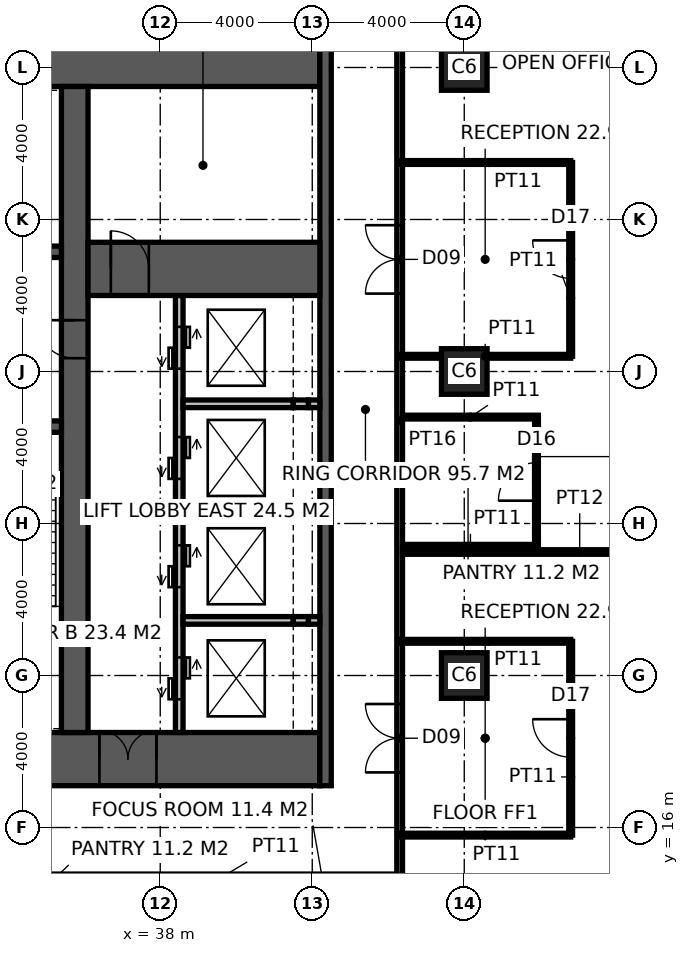
"""IFC4 building model, lengths in metres.
Left out: names, types, materials, properties, quantities, classifications, styles, units other than length and angle.
Written with IfcOpenShell. Run it as: python <this file> out.ifc"""

import sys

from ifc_helpers import new_model, si_unit, direction, frame, frame_2d, origin, origin_2d, place, context, subcontext, project, spatial, rectangle, hollow_rectangle, extrude, element, fill, save


model = new_model("IFC4")
c1 = context("Model", 3, precision=1e-05, world=origin(), true_north=direction((0.0, 1.0)))
c2 = subcontext(c1, "Body", "Model", "MODEL_VIEW")
j1 = project(units=[si_unit("LENGTHUNIT", "METRE"), si_unit("PLANEANGLEUNIT", "RADIAN")], contexts=[c1])
p1 = place(None, origin())
s1 = spatial("IfcSite", under=j1, at=p1, CompositionType="ELEMENT")
p2 = place(p1, origin())
s2 = spatial("IfcBuilding", under=s1, at=p2, CompositionType="ELEMENT")
p3 = place(p2, frame((0.0, 0.0, 67.0)))
s3 = spatial("IfcBuildingStorey", under=s2, at=p3, CompositionType="ELEMENT", Elevation=67.0)
for number, where, z_axis, x_axis in (
    (1, (46.0, 20.0, 0.0), (0.0, 0.0, 1.0), (1.0, 0.0, 0.0)),
    (2, (46.0, 28.0, 0.0), (0.0, 0.0, 1.0), (1.0, 0.0, 0.0)),
    (3, (46.0, 36.0, 0.0), (0.0, 0.0, 1.0), (1.0, 0.0, 0.0)),
):
    element("IfcColumn", number, at=place(p3, frame(where, z_axis=z_axis, x_axis=x_axis)), inside=s3, PredefinedType="COLUMN", context=c2, shape_type="SweptSolid", body=[
        extrude(hollow_rectangle(XDim=1.2, YDim=1.2, WallThickness=0.125, at=origin_2d()), origin(), (0.0, 0.0, 1.0), 4.0),
    ])
p4 = place(p3, frame((18.5, 17.8, -0.15), z_axis=(0.0, 0.0, 1.0), x_axis=(1.0, 0.0, 0.0)))
e4 = element("IfcWall", 4, at=p4, inside=s3, PredefinedType="SHEAR", context=c2, shape_type="SweptSolid", body=[
    extrude(rectangle(XDim=23.7, YDim=1.4, at=frame_2d((11.85, 0.0))), origin(), (0.0, 0.0, 1.0), 4.0),
])
p5 = place(p4, frame((3.45, 0.0, 0.15)))
e5 = element("IfcOpeningElement", 5, at=p5, cuts=e4, PredefinedType="OPENING", context=c2, shape_type="SweptSolid", body=[
    extrude(rectangle(XDim=1.5, YDim=2.4, at=frame_2d((0.75, 1.2))), frame((0.0, 0.71, 0.0), z_axis=(0.0, -1.0, 0.0), x_axis=(1.0, 0.0, 0.0)), (0.0, 0.0, 1.0), 1.42),
])
p6 = place(p4, frame((17.9, 0.0, 0.15)))
e6 = element("IfcOpeningElement", 6, at=p6, cuts=e4, PredefinedType="OPENING", context=c2, shape_type="SweptSolid", body=[
    extrude(rectangle(XDim=1.5, YDim=2.4, at=frame_2d((0.75, 1.2))), frame((0.0, 0.71, 0.0), z_axis=(0.0, -1.0, 0.0), x_axis=(1.0, 0.0, 0.0)), (0.0, 0.0, 1.0), 1.42),
])
p7 = place(p4, frame((0.9, 0.0, 0.15)))
e7 = element("IfcOpeningElement", 7, at=p7, cuts=e4, PredefinedType="OPENING", context=c2, shape_type="SweptSolid", body=[
    extrude(rectangle(XDim=1.0, YDim=2.2, at=frame_2d((0.5, 1.1))), frame((0.0, 0.71, 0.0), z_axis=(0.0, -1.0, 0.0), x_axis=(1.0, 0.0, 0.0)), (0.0, 0.0, 1.0), 1.42),
])
p8 = place(p3, frame((18.5, 36.2, -0.15), z_axis=(0.0, 0.0, 1.0), x_axis=(1.0, 0.0, 0.0)))
e8 = element("IfcWall", 8, at=p8, inside=s3, PredefinedType="SHEAR", context=c2, shape_type="SweptSolid", body=[
    extrude(rectangle(XDim=23.7, YDim=1.4, at=frame_2d((11.85, 0.0))), origin(), (0.0, 0.0, 1.0), 4.0),
])
p9 = place(p3, frame((42.35, 17.1, -0.15), z_axis=(0.0, 0.0, 1.0), x_axis=(0.0, 1.0, 0.0)))
e9 = element("IfcWall", 9, at=p9, inside=s3, PredefinedType="SHEAR", context=c2, shape_type="SweptSolid", body=[
    extrude(rectangle(XDim=19.8, YDim=0.3, at=frame_2d((9.9, 0.0))), origin(), (0.0, 0.0, 1.0), 4.0),
])
p10 = place(p3, frame((35.75, 18.5, -0.15), z_axis=(0.0, 0.0, 1.0), x_axis=(0.0, 1.0, 0.0)))
e10 = element("IfcWall", 10, at=p10, inside=s3, PredefinedType="SHEAR", context=c2, shape_type="SweptSolid", body=[
    extrude(rectangle(XDim=17.0, YDim=0.7, at=frame_2d((8.5, 0.0))), origin(), (0.0, 0.0, 1.0), 4.0),
])
p11 = place(p10, frame((9.85, 0.0, 0.15)))
e11 = element("IfcOpeningElement", 11, at=p11, cuts=e10, PredefinedType="OPENING", context=c2, shape_type="SweptSolid", body=[
    extrude(rectangle(XDim=1.0, YDim=2.2, at=frame_2d((0.5, 1.1))), frame((0.0, 0.36, 0.0), z_axis=(0.0, -1.0, 0.0), x_axis=(1.0, 0.0, 0.0)), (0.0, 0.0, 1.0), 0.72),
])
p12 = place(p3, frame((24.15, 26.55, -0.15), z_axis=(0.0, 0.0, 1.0), x_axis=(1.0, 0.0, 0.0)))
e12 = element("IfcWall", 12, at=p12, inside=s3, PredefinedType="SHEAR", context=c2, shape_type="SweptSolid", body=[
    extrude(rectangle(XDim=11.25, YDim=0.3, at=frame_2d((5.625, 0.0))), origin(), (0.0, 0.0, 1.0), 4.0),
])
p13 = place(p12, frame((9.25, 0.0, 0.15)))
e13 = element("IfcOpeningElement", 13, at=p13, cuts=e12, PredefinedType="OPENING", context=c2, shape_type="SweptSolid", body=[
    extrude(rectangle(XDim=1.0, YDim=2.2, at=frame_2d((0.5, 1.1))), frame((0.0, 0.16, 0.0), z_axis=(0.0, -1.0, 0.0), x_axis=(1.0, 0.0, 0.0)), (0.0, 0.0, 1.0), 0.32),
])
p14 = place(p12, frame((4.9, 0.0, 0.15)))
e14 = element("IfcOpeningElement", 14, at=p14, cuts=e12, PredefinedType="OPENING", context=c2, shape_type="SweptSolid", body=[
    extrude(rectangle(XDim=1.5, YDim=2.4, at=frame_2d((0.75, 1.2))), frame((0.0, 0.16, 0.0), z_axis=(0.0, -1.0, 0.0), x_axis=(1.0, 0.0, 0.0)), (0.0, 0.0, 1.0), 0.32),
])
p15 = place(p3, frame((24.15, 31.15, -0.15), z_axis=(0.0, 0.0, 1.0), x_axis=(1.0, 0.0, 0.0)))
e15 = element("IfcWall", 15, at=p15, inside=s3, PredefinedType="SHEAR", context=c2, shape_type="SweptSolid", body=[
    extrude(rectangle(XDim=11.25, YDim=0.3, at=frame_2d((5.625, 0.0))), origin(), (0.0, 0.0, 1.0), 4.0),
])
p16 = place(p15, frame((7.25, 0.0, 0.15)))
e16 = element("IfcOpeningElement", 16, at=p16, cuts=e15, PredefinedType="OPENING", context=c2, shape_type="SweptSolid", body=[
    extrude(rectangle(XDim=1.4, YDim=2.4, at=frame_2d((0.7, 1.2))), frame((0.0, 0.16, 0.0), z_axis=(0.0, -1.0, 0.0), x_axis=(1.0, 0.0, 0.0)), (0.0, 0.0, 1.0), 0.32),
])
p17 = place(p3, frame((38.5, 18.5, -0.15), z_axis=(0.0, 0.0, 1.0), x_axis=(0.0, 1.0, 0.0)))
e17 = element("IfcWall", 17, at=p17, inside=s3, PredefinedType="SOLIDWALL", context=c2, shape_type="SweptSolid", body=[
    extrude(rectangle(XDim=11.5, YDim=0.2, at=frame_2d((5.75, 0.0))), origin(), (0.0, 0.0, 1.0), 4.0),
])
p18 = place(p17, frame((0.875, 0.0, 0.15)))
e18 = element("IfcOpeningElement", 18, at=p18, cuts=e17, PredefinedType="OPENING", context=c2, shape_type="SweptSolid", body=[
    extrude(rectangle(XDim=1.1, YDim=2.2, at=frame_2d((0.55, 1.1))), frame((0.0, 0.11, 0.0), z_axis=(0.0, -1.0, 0.0), x_axis=(1.0, 0.0, 0.0)), (0.0, 0.0, 1.0), 0.22),
])
p19 = place(p17, frame((3.825, 0.0, 0.15)))
e19 = element("IfcOpeningElement", 19, at=p19, cuts=e17, PredefinedType="OPENING", context=c2, shape_type="SweptSolid", body=[
    extrude(rectangle(XDim=1.1, YDim=2.2, at=frame_2d((0.55, 1.1))), frame((0.0, 0.11, 0.0), z_axis=(0.0, -1.0, 0.0), x_axis=(1.0, 0.0, 0.0)), (0.0, 0.0, 1.0), 0.22),
])
p20 = place(p17, frame((6.675, 0.0, 0.15)))
e20 = element("IfcOpeningElement", 20, at=p20, cuts=e17, PredefinedType="OPENING", context=c2, shape_type="SweptSolid", body=[
    extrude(rectangle(XDim=1.1, YDim=2.2, at=frame_2d((0.55, 1.1))), frame((0.0, 0.11, 0.0), z_axis=(0.0, -1.0, 0.0), x_axis=(1.0, 0.0, 0.0)), (0.0, 0.0, 1.0), 0.22),
])
p21 = place(p17, frame((9.575, 0.0, 0.15)))
e21 = element("IfcOpeningElement", 21, at=p21, cuts=e17, PredefinedType="OPENING", context=c2, shape_type="SweptSolid", body=[
    extrude(rectangle(XDim=1.1, YDim=2.2, at=frame_2d((0.55, 1.1))), frame((0.0, 0.11, 0.0), z_axis=(0.0, -1.0, 0.0), x_axis=(1.0, 0.0, 0.0)), (0.0, 0.0, 1.0), 0.22),
])
p22 = place(p3, frame((36.1, 30.7, -0.15), z_axis=(0.0, 0.0, 1.0), x_axis=(1.0, 0.0, 0.0)))
e22 = element("IfcWall", 22, at=p22, inside=s3, PredefinedType="SHEAR", context=c2, shape_type="SweptSolid", body=[
    extrude(rectangle(XDim=6.1, YDim=1.4, at=frame_2d((3.05, 0.0))), origin(), (0.0, 0.0, 1.0), 4.0),
])
p23 = place(p22, frame((0.6, 0.0, 0.15)))
e23 = element("IfcOpeningElement", 23, at=p23, cuts=e22, PredefinedType="OPENING", context=c2, shape_type="SweptSolid", body=[
    extrude(rectangle(XDim=1.0, YDim=2.2, at=frame_2d((0.5, 1.1))), frame((0.0, 0.71, 0.0), z_axis=(0.0, -1.0, 0.0), x_axis=(1.0, 0.0, 0.0)), (0.0, 0.0, 1.0), 1.42),
])
p24 = place(p3, frame((38.6, 21.45, -0.15), z_axis=(0.0, 0.0, 1.0), x_axis=(1.0, 0.0, 0.0)))
e24 = element("IfcWall", 24, at=p24, inside=s3, PredefinedType="SOLIDWALL", context=c2, shape_type="SweptSolid", body=[
    extrude(rectangle(XDim=2.9, YDim=0.2, at=frame_2d((1.45, 0.0))), origin(), (0.0, 0.0, 1.0), 4.0),
])
p25 = place(p3, frame((41.5, 21.45, -0.15), z_axis=(0.0, 0.0, 1.0), x_axis=(1.0, 0.0, 0.0)))
e25 = element("IfcWall", 25, at=p25, inside=s3, PredefinedType="SOLIDWALL", context=c2, shape_type="SweptSolid", body=[
    extrude(rectangle(XDim=0.4, YDim=0.2, at=frame_2d((0.2, 0.0))), origin(), (0.0, 0.0, 1.0), 4.0),
])
p26 = place(p3, frame((41.9, 21.45, -0.15), z_axis=(0.0, 0.0, 1.0), x_axis=(1.0, 0.0, 0.0)))
e26 = element("IfcWall", 26, at=p26, inside=s3, PredefinedType="SOLIDWALL", context=c2, shape_type="SweptSolid", body=[
    extrude(rectangle(XDim=0.3, YDim=0.2, at=frame_2d((0.15, 0.0))), origin(), (0.0, 0.0, 1.0), 4.0),
])
p27 = place(p3, frame((38.6, 24.3, -0.15), z_axis=(0.0, 0.0, 1.0), x_axis=(1.0, 0.0, 0.0)))
e27 = element("IfcWall", 27, at=p27, inside=s3, PredefinedType="SOLIDWALL", context=c2, shape_type="SweptSolid", body=[
    extrude(rectangle(XDim=2.9, YDim=0.2, at=frame_2d((1.45, 0.0))), origin(), (0.0, 0.0, 1.0), 4.0),
])
p28 = place(p3, frame((41.5, 24.3, -0.15), z_axis=(0.0, 0.0, 1.0), x_axis=(1.0, 0.0, 0.0)))
e28 = element("IfcWall", 28, at=p28, inside=s3, PredefinedType="SOLIDWALL", context=c2, shape_type="SweptSolid", body=[
    extrude(rectangle(XDim=0.4, YDim=0.2, at=frame_2d((0.2, 0.0))), origin(), (0.0, 0.0, 1.0), 4.0),
])
p29 = place(p3, frame((41.9, 24.3, -0.15), z_axis=(0.0, 0.0, 1.0), x_axis=(1.0, 0.0, 0.0)))
e29 = element("IfcWall", 29, at=p29, inside=s3, PredefinedType="SOLIDWALL", context=c2, shape_type="SweptSolid", body=[
    extrude(rectangle(XDim=0.3, YDim=0.2, at=frame_2d((0.15, 0.0))), origin(), (0.0, 0.0, 1.0), 4.0),
])
p30 = place(p3, frame((38.6, 27.15, -0.15), z_axis=(0.0, 0.0, 1.0), x_axis=(1.0, 0.0, 0.0)))
e30 = element("IfcWall", 30, at=p30, inside=s3, PredefinedType="SOLIDWALL", context=c2, shape_type="SweptSolid", body=[
    extrude(rectangle(XDim=2.9, YDim=0.2, at=frame_2d((1.45, 0.0))), origin(), (0.0, 0.0, 1.0), 4.0),
])
p31 = place(p3, frame((41.5, 27.15, -0.15), z_axis=(0.0, 0.0, 1.0), x_axis=(1.0, 0.0, 0.0)))
e31 = element("IfcWall", 31, at=p31, inside=s3, PredefinedType="SOLIDWALL", context=c2, shape_type="SweptSolid", body=[
    extrude(rectangle(XDim=0.4, YDim=0.2, at=frame_2d((0.2, 0.0))), origin(), (0.0, 0.0, 1.0), 4.0),
])
p32 = place(p3, frame((41.9, 27.15, -0.15), z_axis=(0.0, 0.0, 1.0), x_axis=(1.0, 0.0, 0.0)))
e32 = element("IfcWall", 32, at=p32, inside=s3, PredefinedType="SOLIDWALL", context=c2, shape_type="SweptSolid", body=[
    extrude(rectangle(XDim=0.3, YDim=0.2, at=frame_2d((0.15, 0.0))), origin(), (0.0, 0.0, 1.0), 4.0),
])
p33 = place(p3, frame((44.3, 14.625, 0.0), z_axis=(0.0, 0.0, 1.0), x_axis=(0.0, 1.0, 0.0)))
e33 = element("IfcWall", 33, at=p33, inside=s3, PredefinedType="PARTITIONING", context=c2, shape_type="SweptSolid", body=[
    extrude(rectangle(XDim=24.15, YDim=0.15, at=frame_2d((12.075, 0.0))), origin(), (0.0, 0.0, 1.0), 3.85),
])
p34 = place(p33, frame((2.825, 0.0, 0.0)))
e34 = element("IfcOpeningElement", 34, at=p34, cuts=e33, PredefinedType="OPENING", context=c2, shape_type="SweptSolid", body=[
    extrude(rectangle(XDim=1.8, YDim=2.4, at=frame_2d((0.9, 1.2))), frame((0.0, 0.085, 0.0), z_axis=(0.0, -1.0, 0.0), x_axis=(1.0, 0.0, 0.0)), (0.0, 0.0, 1.0), 0.17),
])
p35 = place(p33, frame((15.425, 0.0, 0.0)))
e35 = element("IfcOpeningElement", 35, at=p35, cuts=e33, PredefinedType="OPENING", context=c2, shape_type="SweptSolid", body=[
    extrude(rectangle(XDim=1.8, YDim=2.4, at=frame_2d((0.9, 1.2))), frame((0.0, 0.085, 0.0), z_axis=(0.0, -1.0, 0.0), x_axis=(1.0, 0.0, 0.0)), (0.0, 0.0, 1.0), 0.17),
])
p36 = place(p3, frame((44.375, 23.25, 0.0), z_axis=(0.0, 0.0, 1.0), x_axis=(1.0, 0.0, 0.0)))
e36 = element("IfcWall", 36, at=p36, inside=s3, PredefinedType="PARTITIONING", context=c2, shape_type="SweptSolid", body=[
    extrude(rectangle(XDim=9.325, YDim=0.12, at=frame_2d((4.663, 0.0))), origin(), (0.0, 0.0, 1.0), 3.85),
])
p37 = place(p3, frame((44.375, 23.4, 0.0), z_axis=(0.0, 0.0, 1.0), x_axis=(1.0, 0.0, 0.0)))
e37 = element("IfcWall", 37, at=p37, inside=s3, PredefinedType="PARTITIONING", context=c2, shape_type="SweptSolid", body=[
    extrude(rectangle(XDim=3.575, YDim=0.1, at=frame_2d((1.788, 0.0))), origin(), (0.0, 0.0, 1.0), 2.65),
])
p38 = place(p3, frame((44.375, 26.8, 0.0), z_axis=(0.0, 0.0, 1.0), x_axis=(1.0, 0.0, 0.0)))
e38 = element("IfcWall", 38, at=p38, inside=s3, PredefinedType="PARTITIONING", context=c2, shape_type="SweptSolid", body=[
    extrude(rectangle(XDim=3.575, YDim=0.1, at=frame_2d((1.788, 0.0))), origin(), (0.0, 0.0, 1.0), 3.85),
])
p39 = place(p3, frame((47.9, 23.45, 0.0), z_axis=(0.0, 0.0, 1.0), x_axis=(0.0, 1.0, 0.0)))
e39 = element("IfcWall", 39, at=p39, inside=s3, PredefinedType="PARTITIONING", context=c2, shape_type="SweptSolid", body=[
    extrude(rectangle(XDim=3.3, YDim=0.1, at=frame_2d((1.65, 0.0))), origin(), (0.0, 0.0, 1.0), 3.85),
])
p40 = place(p39, frame((1.15, 0.0, 0.0)))
e40 = element("IfcOpeningElement", 40, at=p40, cuts=e39, PredefinedType="OPENING", context=c2, shape_type="SweptSolid", body=[
    extrude(rectangle(XDim=1.0, YDim=2.2, at=frame_2d((0.5, 1.1))), frame((0.0, 0.06, 0.0), z_axis=(0.0, -1.0, 0.0), x_axis=(1.0, 0.0, 0.0)), (0.0, 0.0, 1.0), 0.12),
])
p41 = place(p3, frame((44.3, 15.8, 0.0), z_axis=(0.0, 0.0, 1.0), x_axis=(1.0, 0.0, 0.0)))
e41 = element("IfcWall", 41, at=p41, inside=s3, PredefinedType="PARTITIONING", context=c2, shape_type="SweptSolid", body=[
    extrude(rectangle(XDim=4.5, YDim=0.1, at=frame_2d((2.25, 0.0))), origin(), (0.0, 0.0, 1.0), 3.85),
])
p42 = place(p3, frame((48.8, 15.8, 0.0), z_axis=(0.0, 0.0, 1.0), x_axis=(0.0, 1.0, 0.0)))
e42 = element("IfcWall", 42, at=p42, inside=s3, PredefinedType="PARTITIONING", context=c2, shape_type="SweptSolid", body=[
    extrude(rectangle(XDim=5.1, YDim=0.1, at=frame_2d((2.55, 0.0))), origin(), (0.0, 0.0, 1.0), 3.85),
])
p43 = place(p42, frame((2.05, 0.0, 0.0)))
e43 = element("IfcOpeningElement", 43, at=p43, cuts=e42, PredefinedType="OPENING", context=c2, shape_type="SweptSolid", body=[
    extrude(rectangle(XDim=1.0, YDim=2.2, at=frame_2d((0.5, 1.1))), frame((0.0, 0.06, 0.0), z_axis=(0.0, -1.0, 0.0), x_axis=(1.0, 0.0, 0.0)), (0.0, 0.0, 1.0), 0.12),
])
p44 = place(p3, frame((48.8, 20.9, 0.0), z_axis=(0.0, 0.0, 1.0), x_axis=(-1.0, 0.0, 0.0)))
e44 = element("IfcWall", 44, at=p44, inside=s3, PredefinedType="PARTITIONING", context=c2, shape_type="SweptSolid", body=[
    extrude(rectangle(XDim=4.5, YDim=0.1, at=frame_2d((2.25, 0.0))), origin(), (0.0, 0.0, 1.0), 3.85),
])
p45 = place(p3, frame((44.3, 28.4, 0.0), z_axis=(0.0, 0.0, 1.0), x_axis=(1.0, 0.0, 0.0)))
e45 = element("IfcWall", 45, at=p45, inside=s3, PredefinedType="PARTITIONING", context=c2, shape_type="SweptSolid", body=[
    extrude(rectangle(XDim=4.5, YDim=0.1, at=frame_2d((2.25, 0.0))), origin(), (0.0, 0.0, 1.0), 2.65),
])
p46 = place(p3, frame((48.8, 28.4, 0.0), z_axis=(0.0, 0.0, 1.0), x_axis=(0.0, 1.0, 0.0)))
e46 = element("IfcWall", 46, at=p46, inside=s3, PredefinedType="PARTITIONING", context=c2, shape_type="SweptSolid", body=[
    extrude(rectangle(XDim=5.1, YDim=0.1, at=frame_2d((2.55, 0.0))), origin(), (0.0, 0.0, 1.0), 3.85),
])
p47 = place(p46, frame((2.05, 0.0, 0.0)))
e47 = element("IfcOpeningElement", 47, at=p47, cuts=e46, PredefinedType="OPENING", context=c2, shape_type="SweptSolid", body=[
    extrude(rectangle(XDim=1.0, YDim=2.2, at=frame_2d((0.5, 1.1))), frame((0.0, 0.06, 0.0), z_axis=(0.0, -1.0, 0.0), x_axis=(1.0, 0.0, 0.0)), (0.0, 0.0, 1.0), 0.12),
])
p48 = place(p3, frame((48.8, 33.5, 0.0), z_axis=(0.0, 0.0, 1.0), x_axis=(-1.0, 0.0, 0.0)))
e48 = element("IfcWall", 48, at=p48, inside=s3, PredefinedType="PARTITIONING", context=c2, shape_type="SweptSolid", body=[
    extrude(rectangle(XDim=4.5, YDim=0.1, at=frame_2d((2.25, 0.0))), origin(), (0.0, 0.0, 1.0), 3.85),
])
p49 = place(p11, origin())
e49 = element("IfcDoor", 49, at=p49, inside=s3, OperationType="SINGLE_SWING_RIGHT", PredefinedType="DOOR", context=c2, shape_type="SweptSolid", body=[
    extrude(rectangle(XDim=1.0, YDim=2.2, at=frame_2d((0.5, 1.1))), frame((0.0, 0.025, 0.0), z_axis=(0.0, -1.0, 0.0), x_axis=(1.0, 0.0, 0.0)), (0.0, 0.0, 1.0), 0.05),
])
fill(e11, e49)
p50 = place(p6, origin())
e50 = element("IfcDoor", 50, at=p50, inside=s3, OperationType="DOUBLE_DOOR_DOUBLE_SWING", PredefinedType="DOOR", context=c2, shape_type="SweptSolid", body=[
    extrude(rectangle(XDim=1.5, YDim=2.4, at=frame_2d((0.75, 1.2))), frame((0.0, 0.025, 0.0), z_axis=(0.0, -1.0, 0.0), x_axis=(1.0, 0.0, 0.0)), (0.0, 0.0, 1.0), 0.05),
])
fill(e6, e50)
p51 = place(p23, origin())
e51 = element("IfcDoor", 51, at=p51, inside=s3, OperationType="SINGLE_SWING_LEFT", PredefinedType="DOOR", context=c2, shape_type="SweptSolid", body=[
    extrude(rectangle(XDim=1.0, YDim=2.2, at=frame_2d((0.5, 1.1))), frame((0.0, 0.025, 0.0), z_axis=(0.0, -1.0, 0.0), x_axis=(1.0, 0.0, 0.0)), (0.0, 0.0, 1.0), 0.05),
])
fill(e23, e51)
p52 = place(p34, origin())
e52 = element("IfcDoor", 52, at=p52, inside=s3, OperationType="DOUBLE_DOOR_DOUBLE_SWING", PredefinedType="DOOR", context=c2, shape_type="SweptSolid", body=[
    extrude(rectangle(XDim=1.8, YDim=2.4, at=frame_2d((0.9, 1.2))), frame((0.0, 0.025, 0.0), z_axis=(0.0, -1.0, 0.0), x_axis=(1.0, 0.0, 0.0)), (0.0, 0.0, 1.0), 0.05),
])
fill(e34, e52)
p53 = place(p35, origin())
e53 = element("IfcDoor", 53, at=p53, inside=s3, OperationType="DOUBLE_DOOR_DOUBLE_SWING", PredefinedType="DOOR", context=c2, shape_type="SweptSolid", body=[
    extrude(rectangle(XDim=1.8, YDim=2.4, at=frame_2d((0.9, 1.2))), frame((0.0, 0.025, 0.0), z_axis=(0.0, -1.0, 0.0), x_axis=(1.0, 0.0, 0.0)), (0.0, 0.0, 1.0), 0.05),
])
fill(e35, e53)
p54 = place(p40, origin())
e54 = element("IfcDoor", 54, at=p54, inside=s3, OperationType="SINGLE_SWING_LEFT", PredefinedType="DOOR", context=c2, shape_type="SweptSolid", body=[
    extrude(rectangle(XDim=1.0, YDim=2.2, at=frame_2d((0.5, 1.1))), frame((0.0, 0.025, 0.0), z_axis=(0.0, -1.0, 0.0), x_axis=(1.0, 0.0, 0.0)), (0.0, 0.0, 1.0), 0.05),
])
fill(e40, e54)
p55 = place(p43, origin())
e55 = element("IfcDoor", 55, at=p55, inside=s3, OperationType="SINGLE_SWING_RIGHT", PredefinedType="DOOR", context=c2, shape_type="SweptSolid", body=[
    extrude(rectangle(XDim=1.0, YDim=2.2, at=frame_2d((0.5, 1.1))), frame((0.0, 0.025, 0.0), z_axis=(0.0, -1.0, 0.0), x_axis=(1.0, 0.0, 0.0)), (0.0, 0.0, 1.0), 0.05),
])
fill(e43, e55)
p56 = place(p47, origin())
e56 = element("IfcDoor", 56, at=p56, inside=s3, OperationType="SINGLE_SWING_RIGHT", PredefinedType="DOOR", context=c2, shape_type="SweptSolid", body=[
    extrude(rectangle(XDim=1.0, YDim=2.2, at=frame_2d((0.5, 1.1))), frame((0.0, 0.025, 0.0), z_axis=(0.0, -1.0, 0.0), x_axis=(1.0, 0.0, 0.0)), (0.0, 0.0, 1.0), 0.05),
])
fill(e47, e56)
p57 = place(p18, origin())
e57 = element("IfcDoor", 57, at=p57, inside=s3, OperationType="DOUBLE_DOOR_SLIDING", PredefinedType="DOOR", context=c2, shape_type="SweptSolid", body=[
    extrude(rectangle(XDim=1.1, YDim=2.2, at=frame_2d((0.55, 1.1))), frame((0.0, 0.025, 0.0), z_axis=(0.0, -1.0, 0.0), x_axis=(1.0, 0.0, 0.0)), (0.0, 0.0, 1.0), 0.05),
])
fill(e18, e57)
p58 = place(p19, origin())
e58 = element("IfcDoor", 58, at=p58, inside=s3, OperationType="DOUBLE_DOOR_SLIDING", PredefinedType="DOOR", context=c2, shape_type="SweptSolid", body=[
    extrude(rectangle(XDim=1.1, YDim=2.2, at=frame_2d((0.55, 1.1))), frame((0.0, 0.025, 0.0), z_axis=(0.0, -1.0, 0.0), x_axis=(1.0, 0.0, 0.0)), (0.0, 0.0, 1.0), 0.05),
])
fill(e19, e58)
p59 = place(p20, origin())
e59 = element("IfcDoor", 59, at=p59, inside=s3, OperationType="DOUBLE_DOOR_SLIDING", PredefinedType="DOOR", context=c2, shape_type="SweptSolid", body=[
    extrude(rectangle(XDim=1.1, YDim=2.2, at=frame_2d((0.55, 1.1))), frame((0.0, 0.025, 0.0), z_axis=(0.0, -1.0, 0.0), x_axis=(1.0, 0.0, 0.0)), (0.0, 0.0, 1.0), 0.05),
])
fill(e20, e59)
p60 = place(p21, origin())
e60 = element("IfcDoor", 60, at=p60, inside=s3, OperationType="DOUBLE_DOOR_SLIDING", PredefinedType="DOOR", context=c2, shape_type="SweptSolid", body=[
    extrude(rectangle(XDim=1.1, YDim=2.2, at=frame_2d((0.55, 1.1))), frame((0.0, 0.025, 0.0), z_axis=(0.0, -1.0, 0.0), x_axis=(1.0, 0.0, 0.0)), (0.0, 0.0, 1.0), 0.05),
])
fill(e21, e60)
save(model, sys.argv[1])
